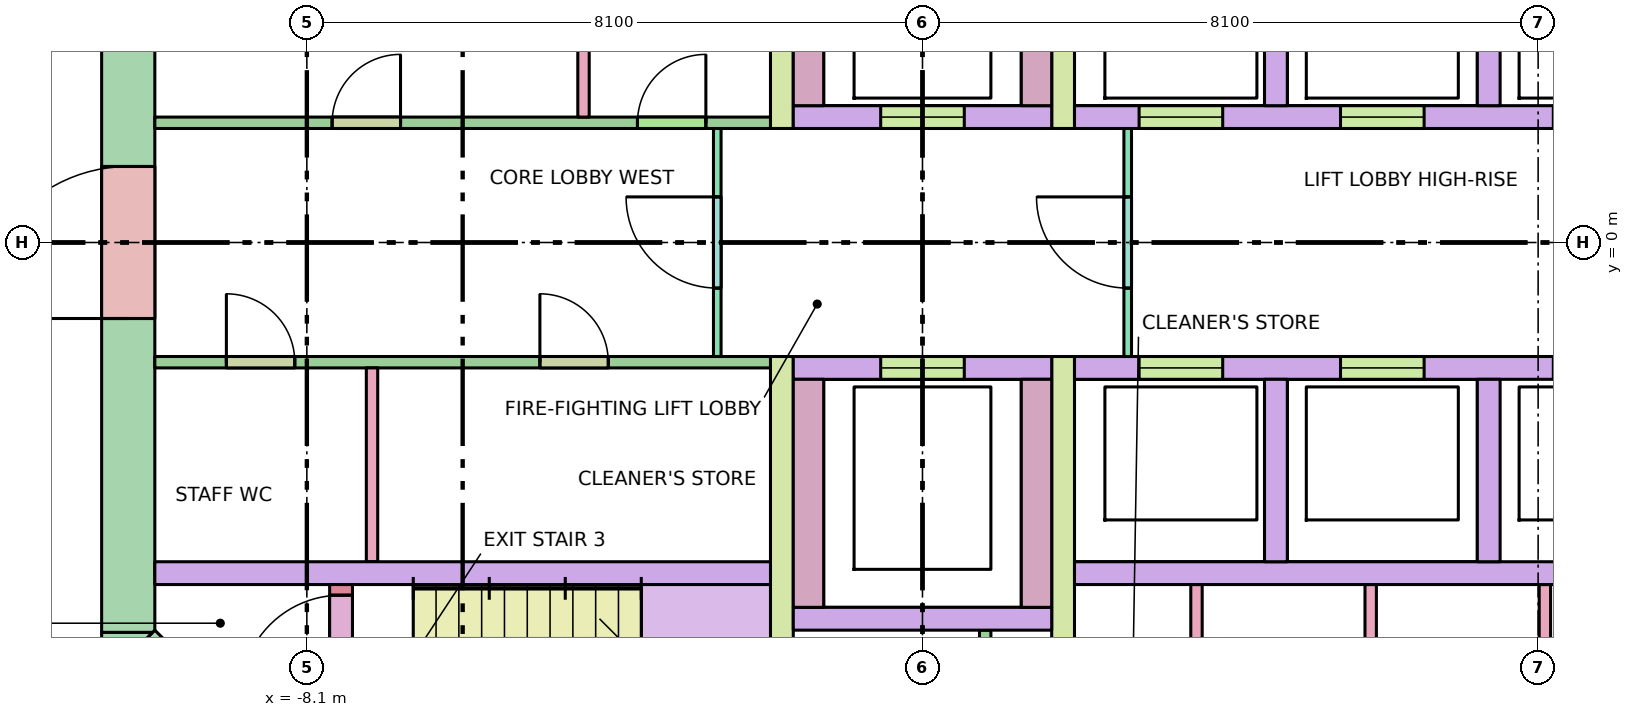
"""IFC4 building model, lengths in metres.
Left out: names, types, materials, properties, quantities, classifications, styles, units other than length and angle.
Written with IfcOpenShell. Run it as: python <this file> out.ifc"""

import sys

from ifc_helpers import new_model, si_unit, direction, frame, frame_2d, origin, place, context, subcontext, project, spatial, polyline, rectangle, outline, extrude, element, fill, save


model = new_model("IFC4")
c1 = context("Model", 3, precision=1e-05, world=origin(), true_north=direction((0.0, 1.0)))
c2 = subcontext(c1, "Body", "Model", "MODEL_VIEW")
j1 = project(units=[si_unit("LENGTHUNIT", "METRE"), si_unit("PLANEANGLEUNIT", "RADIAN")], contexts=[c1])
p1 = place(None, origin())
s1 = spatial("IfcSite", under=j1, at=p1, CompositionType="ELEMENT")
p2 = place(p1, origin())
s2 = spatial("IfcBuilding", under=s1, at=p2, CompositionType="ELEMENT")
p3 = place(p2, frame((0.0, 0.0, 192.8)))
s3 = spatial("IfcBuildingStorey", under=s2, at=p3, CompositionType="ELEMENT", Elevation=192.8)
p4 = place(p3, frame((-10.45, -5.13, -0.28), z_axis=(0.0, 0.0, 1.0), x_axis=(0.0, 1.0, 0.0)))
e1 = element("IfcWall", 1, at=p4, inside=s3, PredefinedType="SHEAR", context=c2, shape_type="SweptSolid", body=[
    extrude(rectangle(XDim=10.26, YDim=0.7, at=frame_2d((5.13, 0.0))), origin(), (0.0, 0.0, 1.0), 3.7),
])
p5 = place(p4, frame((4.13, 0.0, 0.28)))
e2 = element("IfcOpeningElement", 2, at=p5, cuts=e1, PredefinedType="OPENING", context=c2, shape_type="SweptSolid", body=[
    extrude(rectangle(XDim=2.0, YDim=2.1, at=frame_2d((1.0, 1.05))), frame((0.0, 0.36, 0.0), z_axis=(0.0, -1.0, 0.0), x_axis=(1.0, 0.0, 0.0)), (0.0, 0.0, 1.0), 0.72),
])
p6 = place(p3, frame((10.347, -5.347, -0.28), z_axis=(0.0, 0.0, 1.0), x_axis=(-0.707106781187, -0.707106781187, 0.0)))
e3 = element("IfcWall", 3, at=p6, inside=s3, PredefinedType="SHEAR", context=c2, shape_type="SweptSolid", body=[
    extrude(rectangle(XDim=4.243, YDim=0.7, at=frame_2d((2.121, 0.0))), origin(), (0.0, 0.0, 1.0), 3.7),
])
p7 = place(p6, frame((2.823, 0.0, 0.28)))
e4 = element("IfcOpeningElement", 4, at=p7, cuts=e3, PredefinedType="OPENING", context=c2, shape_type="SweptSolid", body=[
    extrude(rectangle(XDim=0.9, YDim=2.1, at=frame_2d((0.45, 1.05))), frame((0.0, 0.36, 0.0), z_axis=(0.0, -1.0, 0.0), x_axis=(1.0, 0.0, 0.0)), (0.0, 0.0, 1.0), 0.72),
])
p8 = place(p6, frame((0.52, 0.0, 0.28)))
e5 = element("IfcOpeningElement", 5, at=p8, cuts=e3, PredefinedType="OPENING", context=c2, shape_type="SweptSolid", body=[
    extrude(rectangle(XDim=0.9, YDim=2.1, at=frame_2d((0.45, 1.05))), frame((0.0, 0.36, 0.0), z_axis=(0.0, -1.0, 0.0), x_axis=(1.0, 0.0, 0.0)), (0.0, 0.0, 1.0), 0.72),
])
p9 = place(p3, frame((-7.347, -8.347, -0.28), z_axis=(0.0, 0.0, 1.0), x_axis=(-0.707106781187, 0.707106781187, 0.0)))
e6 = element("IfcWall", 6, at=p9, inside=s3, PredefinedType="SHEAR", context=c2, shape_type="SweptSolid", body=[
    extrude(rectangle(XDim=4.243, YDim=0.7, at=frame_2d((2.121, 0.0))), origin(), (0.0, 0.0, 1.0), 3.7),
])
p10 = place(p9, frame((2.393, 0.0, 0.28)))
e7 = element("IfcOpeningElement", 7, at=p10, cuts=e6, PredefinedType="OPENING", context=c2, shape_type="SweptSolid", body=[
    extrude(rectangle(XDim=1.2, YDim=2.1, at=frame_2d((0.6, 1.05))), frame((0.0, 0.36, 0.0), z_axis=(0.0, -1.0, 0.0), x_axis=(1.0, 0.0, 0.0)), (0.0, 0.0, 1.0), 0.72),
])
p11 = place(p3, frame((0.0, 0.0, -0.28)))
e8 = element("IfcWall", 8, at=p11, inside=s3, PredefinedType="SHEAR", context=c2, shape_type="SweptSolid", body=[
    extrude(outline(polyline([(-10.8, -5.39), (-10.8, -5.13), (-10.8, -5.13), (-10.13, -5.13), (-10.595, -5.595), (-10.595, -5.595), (-10.595, -5.595), (-10.8, -5.39)])), origin(), (0.0, 0.0, 1.0), 3.7),
])
for number, where, z_axis, x_axis in (
    (9, (-10.1, -4.35, 0.0), (0.0, 0.0, 1.0), (1.0, 0.0, 0.0)),
    (10, (2.0, -4.35, 0.0), (0.0, 0.0, 1.0), (1.0, 0.0, 0.0)),
):
    element("IfcWall", number, at=place(p3, frame(where, z_axis=z_axis, x_axis=x_axis)), inside=s3, PredefinedType="SOLIDWALL", context=c2, shape_type="SweptSolid", body=[
        extrude(rectangle(XDim=8.1, YDim=0.3, at=frame_2d((4.05, 0.0))), origin(), (0.0, 0.0, 1.0), 3.42),
    ])
p12 = place(p3, frame((2.0, 1.65, 0.0), z_axis=(0.0, 0.0, 1.0), x_axis=(1.0, 0.0, 0.0)))
e11 = element("IfcWall", 11, at=p12, inside=s3, PredefinedType="SOLIDWALL", context=c2, shape_type="SweptSolid", body=[
    extrude(rectangle(XDim=8.1, YDim=0.3, at=frame_2d((4.05, 0.0))), origin(), (0.0, 0.0, 1.0), 3.42),
])
p13 = place(p12, frame((0.85, 0.0, 0.0)))
e12 = element("IfcOpeningElement", 12, at=p13, cuts=e11, PredefinedType="OPENING", context=c2, shape_type="SweptSolid", body=[
    extrude(rectangle(XDim=1.1, YDim=2.1, at=frame_2d((0.55, 1.05))), frame((0.0, 0.16, 0.0), z_axis=(0.0, -1.0, 0.0), x_axis=(1.0, 0.0, 0.0)), (0.0, 0.0, 1.0), 0.32),
])
p14 = place(p12, frame((3.5, 0.0, 0.0)))
e13 = element("IfcOpeningElement", 13, at=p14, cuts=e11, PredefinedType="OPENING", context=c2, shape_type="SweptSolid", body=[
    extrude(rectangle(XDim=1.1, YDim=2.1, at=frame_2d((0.55, 1.05))), frame((0.0, 0.16, 0.0), z_axis=(0.0, -1.0, 0.0), x_axis=(1.0, 0.0, 0.0)), (0.0, 0.0, 1.0), 0.32),
])
p15 = place(p12, frame((6.3, 0.0, 0.0)))
e14 = element("IfcOpeningElement", 14, at=p15, cuts=e11, PredefinedType="OPENING", context=c2, shape_type="SweptSolid", body=[
    extrude(rectangle(XDim=1.1, YDim=2.1, at=frame_2d((0.55, 1.05))), frame((0.0, 0.16, 0.0), z_axis=(0.0, -1.0, 0.0), x_axis=(1.0, 0.0, 0.0)), (0.0, 0.0, 1.0), 0.32),
])
p16 = place(p3, frame((2.0, -1.65, 0.0), z_axis=(0.0, 0.0, 1.0), x_axis=(1.0, 0.0, 0.0)))
e15 = element("IfcWall", 15, at=p16, inside=s3, PredefinedType="SOLIDWALL", context=c2, shape_type="SweptSolid", body=[
    extrude(rectangle(XDim=8.1, YDim=0.3, at=frame_2d((4.05, 0.0))), origin(), (0.0, 0.0, 1.0), 3.42),
])
p17 = place(p16, frame((0.85, 0.0, 0.0)))
e16 = element("IfcOpeningElement", 16, at=p17, cuts=e15, PredefinedType="OPENING", context=c2, shape_type="SweptSolid", body=[
    extrude(rectangle(XDim=1.1, YDim=2.1, at=frame_2d((0.55, 1.05))), frame((0.0, 0.16, 0.0), z_axis=(0.0, -1.0, 0.0), x_axis=(1.0, 0.0, 0.0)), (0.0, 0.0, 1.0), 0.32),
])
p18 = place(p16, frame((3.5, 0.0, 0.0)))
e17 = element("IfcOpeningElement", 17, at=p18, cuts=e15, PredefinedType="OPENING", context=c2, shape_type="SweptSolid", body=[
    extrude(rectangle(XDim=1.1, YDim=2.1, at=frame_2d((0.55, 1.05))), frame((0.0, 0.16, 0.0), z_axis=(0.0, -1.0, 0.0), x_axis=(1.0, 0.0, 0.0)), (0.0, 0.0, 1.0), 0.32),
])
p19 = place(p16, frame((6.3, 0.0, 0.0)))
e18 = element("IfcOpeningElement", 18, at=p19, cuts=e15, PredefinedType="OPENING", context=c2, shape_type="SweptSolid", body=[
    extrude(rectangle(XDim=1.1, YDim=2.1, at=frame_2d((0.55, 1.05))), frame((0.0, 0.16, 0.0), z_axis=(0.0, -1.0, 0.0), x_axis=(1.0, 0.0, 0.0)), (0.0, 0.0, 1.0), 0.32),
])
for number, where, z_axis, x_axis in (
    (19, (4.65, 1.8, 0.0), (0.0, 0.0, 1.0), (0.0, 1.0, 0.0)),
    (20, (4.65, -4.2, 0.0), (0.0, 0.0, 1.0), (0.0, 1.0, 0.0)),
    (21, (7.45, 1.8, 0.0), (0.0, 0.0, 1.0), (0.0, 1.0, 0.0)),
    (22, (7.45, -4.2, 0.0), (0.0, 0.0, 1.0), (0.0, 1.0, 0.0)),
):
    element("IfcWall", number, at=place(p3, frame(where, z_axis=z_axis, x_axis=x_axis)), inside=s3, PredefinedType="SOLIDWALL", context=c2, shape_type="SweptSolid", body=[
        extrude(rectangle(XDim=2.4, YDim=0.3, at=frame_2d((1.2, 0.0))), origin(), (0.0, 0.0, 1.0), 3.42),
    ])
for number, where, z_axis, x_axis in (
    (23, (-1.85, 1.5, 0.0), (0.0, 0.0, 1.0), (0.0, 1.0, 0.0)),
    (24, (-1.85, -8.1, 0.0), (0.0, 0.0, 1.0), (0.0, 1.0, 0.0)),
    (25, (1.85, 1.5, 0.0), (0.0, 0.0, 1.0), (0.0, 1.0, 0.0)),
    (26, (1.85, -8.1, 0.0), (0.0, 0.0, 1.0), (0.0, 1.0, 0.0)),
):
    element("IfcWall", number, at=place(p3, frame(where, z_axis=z_axis, x_axis=x_axis)), inside=s3, PredefinedType="SHEAR", context=c2, shape_type="SweptSolid", body=[
        extrude(rectangle(XDim=6.6, YDim=0.3, at=frame_2d((3.3, 0.0))), origin(), (0.0, 0.0, 1.0), 3.42),
    ])
p20 = place(p3, frame((-1.7, 1.65, 0.0), z_axis=(0.0, 0.0, 1.0), x_axis=(1.0, 0.0, 0.0)))
e27 = element("IfcWall", 27, at=p20, inside=s3, PredefinedType="SOLIDWALL", context=c2, shape_type="SweptSolid", body=[
    extrude(rectangle(XDim=3.4, YDim=0.3, at=frame_2d((1.7, 0.0))), origin(), (0.0, 0.0, 1.0), 3.42),
])
p21 = place(p20, frame((1.15, 0.0, 0.0)))
e28 = element("IfcOpeningElement", 28, at=p21, cuts=e27, PredefinedType="OPENING", context=c2, shape_type="SweptSolid", body=[
    extrude(rectangle(XDim=1.1, YDim=2.1, at=frame_2d((0.55, 1.05))), frame((0.0, 0.16, 0.0), z_axis=(0.0, -1.0, 0.0), x_axis=(1.0, 0.0, 0.0)), (0.0, 0.0, 1.0), 0.32),
])
p22 = place(p3, frame((-1.7, -1.65, 0.0), z_axis=(0.0, 0.0, 1.0), x_axis=(1.0, 0.0, 0.0)))
e29 = element("IfcWall", 29, at=p22, inside=s3, PredefinedType="SOLIDWALL", context=c2, shape_type="SweptSolid", body=[
    extrude(rectangle(XDim=3.4, YDim=0.3, at=frame_2d((1.7, 0.0))), origin(), (0.0, 0.0, 1.0), 3.42),
])
p23 = place(p22, frame((1.15, 0.0, 0.0)))
e30 = element("IfcOpeningElement", 30, at=p23, cuts=e29, PredefinedType="OPENING", context=c2, shape_type="SweptSolid", body=[
    extrude(rectangle(XDim=1.1, YDim=2.1, at=frame_2d((0.55, 1.05))), frame((0.0, 0.16, 0.0), z_axis=(0.0, -1.0, 0.0), x_axis=(1.0, 0.0, 0.0)), (0.0, 0.0, 1.0), 0.32),
])
for number, where, z_axis, x_axis in (
    (31, (-1.5, 1.8, 0.0), (0.0, 0.0, 1.0), (0.0, 1.0, 0.0)),
    (32, (-1.5, -4.8, 0.0), (0.0, 0.0, 1.0), (0.0, 1.0, 0.0)),
    (33, (1.5, 1.8, 0.0), (0.0, 0.0, 1.0), (0.0, 1.0, 0.0)),
    (34, (1.5, -4.8, 0.0), (0.0, 0.0, 1.0), (0.0, 1.0, 0.0)),
):
    element("IfcWall", number, at=place(p3, frame(where, z_axis=z_axis, x_axis=x_axis)), inside=s3, PredefinedType="SOLIDWALL", context=c2, shape_type="SweptSolid", body=[
        extrude(rectangle(XDim=3.0, YDim=0.4, at=frame_2d((1.5, 0.0))), origin(), (0.0, 0.0, 1.0), 3.42),
    ])
p24 = place(p3, frame((-1.7, -4.95, 0.0), z_axis=(0.0, 0.0, 1.0), x_axis=(1.0, 0.0, 0.0)))
e35 = element("IfcWall", 35, at=p24, inside=s3, PredefinedType="SOLIDWALL", context=c2, shape_type="SweptSolid", body=[
    extrude(rectangle(XDim=3.4, YDim=0.3, at=frame_2d((1.7, 0.0))), origin(), (0.0, 0.0, 1.0), 3.42),
])
p25 = place(p3, frame((-7.65, -7.64, 0.0), z_axis=(0.0, 0.0, 1.0), x_axis=(0.0, 1.0, 0.0)))
e36 = element("IfcWall", 36, at=p25, inside=s3, PredefinedType="SHEAR", context=c2, shape_type="SweptSolid", body=[
    extrude(rectangle(XDim=3.14, YDim=0.3, at=frame_2d((1.57, 0.0))), origin(), (0.0, 0.0, 1.0), 3.42),
])
p26 = place(p25, frame((1.68, 0.0, 0.0)))
e37 = element("IfcOpeningElement", 37, at=p26, cuts=e36, PredefinedType="OPENING", context=c2, shape_type="SweptSolid", body=[
    extrude(rectangle(XDim=1.32, YDim=2.1, at=frame_2d((0.66, 1.05))), frame((0.0, 0.16, 0.0), z_axis=(0.0, -1.0, 0.0), x_axis=(1.0, 0.0, 0.0)), (0.0, 0.0, 1.0), 0.32),
])
p27 = place(p3, frame((-2.7, -1.5, 0.0), z_axis=(0.0, 0.0, 1.0), x_axis=(0.0, 1.0, 0.0)))
e38 = element("IfcWall", 38, at=p27, inside=s3, PredefinedType="PARTITIONING", context=c2, shape_type="SweptSolid", body=[
    extrude(rectangle(XDim=3.0, YDim=0.1, at=frame_2d((1.5, 0.0))), origin(), (0.0, 0.0, 1.0), 3.42),
])
p28 = place(p27, frame((0.9, 0.0, 0.0)))
e39 = element("IfcOpeningElement", 39, at=p28, cuts=e38, PredefinedType="OPENING", context=c2, shape_type="SweptSolid", body=[
    extrude(rectangle(XDim=1.2, YDim=2.1, at=frame_2d((0.6, 1.05))), frame((0.0, 0.06, 0.0), z_axis=(0.0, -1.0, 0.0), x_axis=(1.0, 0.0, 0.0)), (0.0, 0.0, 1.0), 0.12),
])
p29 = place(p3, frame((2.7, -1.5, 0.0), z_axis=(0.0, 0.0, 1.0), x_axis=(0.0, 1.0, 0.0)))
e40 = element("IfcWall", 40, at=p29, inside=s3, PredefinedType="PARTITIONING", context=c2, shape_type="SweptSolid", body=[
    extrude(rectangle(XDim=3.0, YDim=0.1, at=frame_2d((1.5, 0.0))), origin(), (0.0, 0.0, 1.0), 3.42),
])
p30 = place(p29, frame((0.9, 0.0, 0.0)))
e41 = element("IfcOpeningElement", 41, at=p30, cuts=e40, PredefinedType="OPENING", context=c2, shape_type="SweptSolid", body=[
    extrude(rectangle(XDim=1.2, YDim=2.1, at=frame_2d((0.6, 1.05))), frame((0.0, 0.06, 0.0), z_axis=(0.0, -1.0, 0.0), x_axis=(1.0, 0.0, 0.0)), (0.0, 0.0, 1.0), 0.12),
])
p31 = place(p3, frame((0.825, -8.1, 0.0), z_axis=(0.0, 0.0, 1.0), x_axis=(0.0, 1.0, 0.0)))
e42 = element("IfcWall", 42, at=p31, inside=s3, PredefinedType="PARTITIONING", context=c2, shape_type="SweptSolid", body=[
    extrude(rectangle(XDim=3.0, YDim=0.15, at=frame_2d((1.5, 0.0))), origin(), (0.0, 0.0, 1.0), 3.42),
])
for number, where, z_axis, x_axis in (
    (43, (3.605, -8.1, 0.0), (0.0, 0.0, 1.0), (0.0, 1.0, 0.0)),
    (44, (5.897, -8.1, 0.0), (0.0, 0.0, 1.0), (0.0, 1.0, 0.0)),
):
    element("IfcWall", number, at=place(p3, frame(where, z_axis=z_axis, x_axis=x_axis)), inside=s3, PredefinedType="PARTITIONING", context=c2, shape_type="SweptSolid", body=[
        extrude(rectangle(XDim=3.6, YDim=0.15, at=frame_2d((1.8, 0.0))), origin(), (0.0, 0.0, 1.0), 3.42),
    ])
p32 = place(p3, frame((8.189, -6.936, 0.0), z_axis=(0.0, 0.0, 1.0), x_axis=(0.0, 1.0, 0.0)))
e45 = element("IfcWall", 45, at=p32, inside=s3, PredefinedType="PARTITIONING", context=c2, shape_type="SweptSolid", body=[
    extrude(rectangle(XDim=2.436, YDim=0.15, at=frame_2d((1.218, 0.0))), origin(), (0.0, 0.0, 1.0), 3.42),
])
for number, where, z_axis, x_axis in (
    (46, (-4.46, 1.65, 0.0), (0.0, 0.0, 1.0), (0.0, 1.0, 0.0)),
    (47, (-7.242, -4.2, 0.0), (0.0, 0.0, 1.0), (0.0, 1.0, 0.0)),
):
    element("IfcWall", number, at=place(p3, frame(where, z_axis=z_axis, x_axis=x_axis)), inside=s3, PredefinedType="PARTITIONING", context=c2, shape_type="SweptSolid", body=[
        extrude(rectangle(XDim=2.55, YDim=0.15, at=frame_2d((1.275, 0.0))), origin(), (0.0, 0.0, 1.0), 3.42),
    ])
p33 = place(p3, frame((-10.1, 1.575, 0.0), z_axis=(0.0, 0.0, 1.0), x_axis=(1.0, 0.0, 0.0)))
e48 = element("IfcWall", 48, at=p33, inside=s3, PredefinedType="PARTITIONING", context=c2, shape_type="SweptSolid", body=[
    extrude(rectangle(XDim=8.1, YDim=0.15, at=frame_2d((4.05, 0.0))), origin(), (0.0, 0.0, 1.0), 3.42),
])
p34 = place(p33, frame((2.333, 0.0, 0.0)))
e49 = element("IfcOpeningElement", 49, at=p34, cuts=e48, PredefinedType="OPENING", context=c2, shape_type="SweptSolid", body=[
    extrude(rectangle(XDim=0.9, YDim=2.1, at=frame_2d((0.45, 1.05))), frame((0.0, 0.085, 0.0), z_axis=(0.0, -1.0, 0.0), x_axis=(1.0, 0.0, 0.0)), (0.0, 0.0, 1.0), 0.17),
])
p35 = place(p33, frame((6.35, 0.0, 0.0)))
e50 = element("IfcOpeningElement", 50, at=p35, cuts=e48, PredefinedType="OPENING", context=c2, shape_type="SweptSolid", body=[
    extrude(rectangle(XDim=0.9, YDim=2.1, at=frame_2d((0.45, 1.05))), frame((0.0, 0.085, 0.0), z_axis=(0.0, -1.0, 0.0), x_axis=(1.0, 0.0, 0.0)), (0.0, 0.0, 1.0), 0.17),
])
p36 = place(p3, frame((-10.1, -1.575, 0.0), z_axis=(0.0, 0.0, 1.0), x_axis=(1.0, 0.0, 0.0)))
e51 = element("IfcWall", 51, at=p36, inside=s3, PredefinedType="PARTITIONING", context=c2, shape_type="SweptSolid", body=[
    extrude(rectangle(XDim=8.1, YDim=0.15, at=frame_2d((4.05, 0.0))), origin(), (0.0, 0.0, 1.0), 3.42),
])
p37 = place(p36, frame((0.941, 0.0, 0.0)))
e52 = element("IfcOpeningElement", 52, at=p37, cuts=e51, PredefinedType="OPENING", context=c2, shape_type="SweptSolid", body=[
    extrude(rectangle(XDim=0.9, YDim=2.1, at=frame_2d((0.45, 1.05))), frame((0.0, 0.085, 0.0), z_axis=(0.0, -1.0, 0.0), x_axis=(1.0, 0.0, 0.0)), (0.0, 0.0, 1.0), 0.17),
])
p38 = place(p36, frame((5.066, 0.0, 0.0)))
e53 = element("IfcOpeningElement", 53, at=p38, cuts=e51, PredefinedType="OPENING", context=c2, shape_type="SweptSolid", body=[
    extrude(rectangle(XDim=0.9, YDim=2.1, at=frame_2d((0.45, 1.05))), frame((0.0, 0.085, 0.0), z_axis=(0.0, -1.0, 0.0), x_axis=(1.0, 0.0, 0.0)), (0.0, 0.0, 1.0), 0.17),
])
p39 = place(p13, origin())
e54 = element("IfcDoor", 54, at=p39, inside=s3, OperationType="DOUBLE_DOOR_SLIDING", PredefinedType="DOOR", context=c2, shape_type="SweptSolid", body=[
    extrude(rectangle(XDim=1.1, YDim=2.1, at=frame_2d((0.55, 1.05))), frame((0.0, 0.025, 0.0), z_axis=(0.0, -1.0, 0.0), x_axis=(1.0, 0.0, 0.0)), (0.0, 0.0, 1.0), 0.05),
])
fill(e12, e54)
p40 = place(p14, origin())
e55 = element("IfcDoor", 55, at=p40, inside=s3, OperationType="DOUBLE_DOOR_SLIDING", PredefinedType="DOOR", context=c2, shape_type="SweptSolid", body=[
    extrude(rectangle(XDim=1.1, YDim=2.1, at=frame_2d((0.55, 1.05))), frame((0.0, 0.025, 0.0), z_axis=(0.0, -1.0, 0.0), x_axis=(1.0, 0.0, 0.0)), (0.0, 0.0, 1.0), 0.05),
])
fill(e13, e55)
p41 = place(p17, origin())
e56 = element("IfcDoor", 56, at=p41, inside=s3, OperationType="DOUBLE_DOOR_SLIDING", PredefinedType="DOOR", context=c2, shape_type="SweptSolid", body=[
    extrude(rectangle(XDim=1.1, YDim=2.1, at=frame_2d((0.55, 1.05))), frame((0.0, 0.025, 0.0), z_axis=(0.0, -1.0, 0.0), x_axis=(1.0, 0.0, 0.0)), (0.0, 0.0, 1.0), 0.05),
])
fill(e16, e56)
p42 = place(p18, origin())
e57 = element("IfcDoor", 57, at=p42, inside=s3, OperationType="DOUBLE_DOOR_SLIDING", PredefinedType="DOOR", context=c2, shape_type="SweptSolid", body=[
    extrude(rectangle(XDim=1.1, YDim=2.1, at=frame_2d((0.55, 1.05))), frame((0.0, 0.025, 0.0), z_axis=(0.0, -1.0, 0.0), x_axis=(1.0, 0.0, 0.0)), (0.0, 0.0, 1.0), 0.05),
])
fill(e17, e57)
p43 = place(p21, origin())
e58 = element("IfcDoor", 58, at=p43, inside=s3, OperationType="DOUBLE_DOOR_SLIDING", PredefinedType="DOOR", context=c2, shape_type="SweptSolid", body=[
    extrude(rectangle(XDim=1.1, YDim=2.1, at=frame_2d((0.55, 1.05))), frame((0.0, 0.025, 0.0), z_axis=(0.0, -1.0, 0.0), x_axis=(1.0, 0.0, 0.0)), (0.0, 0.0, 1.0), 0.05),
])
fill(e28, e58)
p44 = place(p23, origin())
e59 = element("IfcDoor", 59, at=p44, inside=s3, OperationType="DOUBLE_DOOR_SLIDING", PredefinedType="DOOR", context=c2, shape_type="SweptSolid", body=[
    extrude(rectangle(XDim=1.1, YDim=2.1, at=frame_2d((0.55, 1.05))), frame((0.0, 0.025, 0.0), z_axis=(0.0, -1.0, 0.0), x_axis=(1.0, 0.0, 0.0)), (0.0, 0.0, 1.0), 0.05),
])
fill(e30, e59)
p45 = place(p26, origin())
e60 = element("IfcDoor", 60, at=p45, inside=s3, OperationType="DOUBLE_DOOR_SINGLE_SWING", PredefinedType="DOOR", context=c2, shape_type="SweptSolid", body=[
    extrude(rectangle(XDim=1.32, YDim=2.1, at=frame_2d((0.66, 1.05))), frame((0.0, 0.025, 0.0), z_axis=(0.0, -1.0, 0.0), x_axis=(1.0, 0.0, 0.0)), (0.0, 0.0, 1.0), 0.05),
])
fill(e37, e60)
p46 = place(p5, origin())
e61 = element("IfcDoor", 61, at=p46, inside=s3, OperationType="DOUBLE_DOOR_SINGLE_SWING", PredefinedType="DOOR", context=c2, shape_type="SweptSolid", body=[
    extrude(rectangle(XDim=2.0, YDim=2.1, at=frame_2d((1.0, 1.05))), frame((0.0, 0.025, 0.0), z_axis=(0.0, -1.0, 0.0), x_axis=(1.0, 0.0, 0.0)), (0.0, 0.0, 1.0), 0.05),
])
fill(e2, e61)
p47 = place(p28, origin())
e62 = element("IfcDoor", 62, at=p47, inside=s3, OperationType="SINGLE_SWING_RIGHT", PredefinedType="DOOR", context=c2, shape_type="SweptSolid", body=[
    extrude(rectangle(XDim=1.2, YDim=2.1, at=frame_2d((0.6, 1.05))), frame((0.0, 0.025, 0.0), z_axis=(0.0, -1.0, 0.0), x_axis=(1.0, 0.0, 0.0)), (0.0, 0.0, 1.0), 0.05),
])
fill(e39, e62)
p48 = place(p30, origin())
e63 = element("IfcDoor", 63, at=p48, inside=s3, OperationType="SINGLE_SWING_RIGHT", PredefinedType="DOOR", context=c2, shape_type="SweptSolid", body=[
    extrude(rectangle(XDim=1.2, YDim=2.1, at=frame_2d((0.6, 1.05))), frame((0.0, 0.025, 0.0), z_axis=(0.0, -1.0, 0.0), x_axis=(1.0, 0.0, 0.0)), (0.0, 0.0, 1.0), 0.05),
])
fill(e41, e63)
p49 = place(p34, origin())
e64 = element("IfcDoor", 64, at=p49, inside=s3, OperationType="SINGLE_SWING_RIGHT", PredefinedType="DOOR", context=c2, shape_type="SweptSolid", body=[
    extrude(rectangle(XDim=0.9, YDim=2.1, at=frame_2d((0.45, 1.05))), frame((0.0, 0.025, 0.0), z_axis=(0.0, -1.0, 0.0), x_axis=(1.0, 0.0, 0.0)), (0.0, 0.0, 1.0), 0.05),
])
fill(e49, e64)
p50 = place(p35, origin())
e65 = element("IfcDoor", 65, at=p50, inside=s3, OperationType="SINGLE_SWING_RIGHT", PredefinedType="DOOR", context=c2, shape_type="SweptSolid", body=[
    extrude(rectangle(XDim=0.9, YDim=2.1, at=frame_2d((0.45, 1.05))), frame((0.0, 0.025, 0.0), z_axis=(0.0, -1.0, 0.0), x_axis=(1.0, 0.0, 0.0)), (0.0, 0.0, 1.0), 0.05),
])
fill(e50, e65)
p51 = place(p37, origin())
e66 = element("IfcDoor", 66, at=p51, inside=s3, OperationType="SINGLE_SWING_LEFT", PredefinedType="DOOR", context=c2, shape_type="SweptSolid", body=[
    extrude(rectangle(XDim=0.9, YDim=2.1, at=frame_2d((0.45, 1.05))), frame((0.0, 0.025, 0.0), z_axis=(0.0, -1.0, 0.0), x_axis=(1.0, 0.0, 0.0)), (0.0, 0.0, 1.0), 0.05),
])
fill(e52, e66)
p52 = place(p38, origin())
e67 = element("IfcDoor", 67, at=p52, inside=s3, OperationType="SINGLE_SWING_LEFT", PredefinedType="DOOR", context=c2, shape_type="SweptSolid", body=[
    extrude(rectangle(XDim=0.9, YDim=2.1, at=frame_2d((0.45, 1.05))), frame((0.0, 0.025, 0.0), z_axis=(0.0, -1.0, 0.0), x_axis=(1.0, 0.0, 0.0)), (0.0, 0.0, 1.0), 0.05),
])
fill(e53, e67)
save(model, sys.argv[1])
